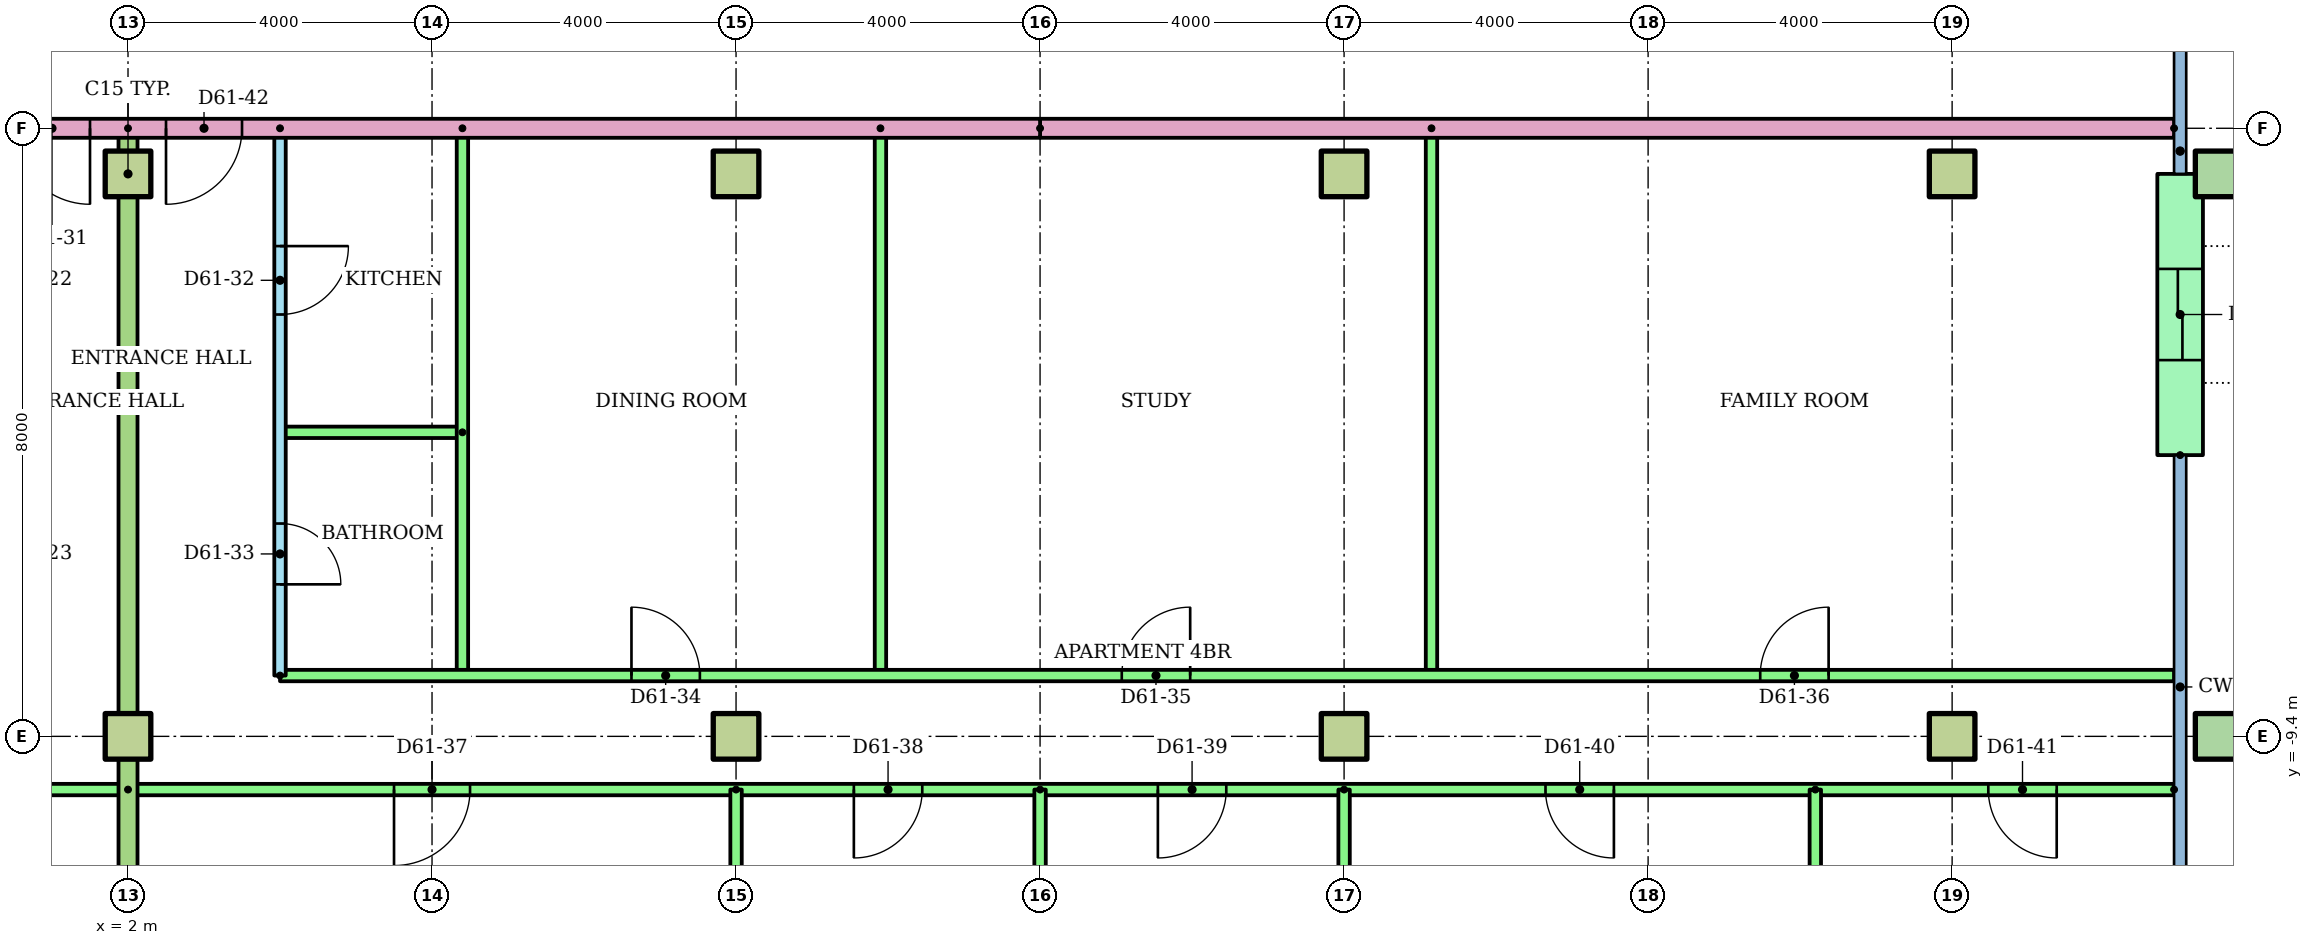
"""IFC4 building model, lengths in metres.
Left out: names, types, materials, properties, quantities, classifications, styles, units other than length and angle.
Written with IfcOpenShell. Run it as: python <this file> out.ifc"""

import sys

from ifc_helpers import new_model, si_unit, direction, frame, frame_2d, origin, origin_2d, place, context, subcontext, project, spatial, rectangle, hollow_rectangle, extrude, element, fill, save


model = new_model("IFC4")
c1 = context("Model", 3, precision=1e-05, world=origin(), true_north=direction((0.0, 1.0)))
c2 = subcontext(c1, "Body", "Model", "MODEL_VIEW")
j1 = project(units=[si_unit("LENGTHUNIT", "METRE"), si_unit("PLANEANGLEUNIT", "RADIAN")], contexts=[c1])
p1 = place(None, origin())
s1 = spatial("IfcSite", under=j1, at=p1, CompositionType="ELEMENT")
p2 = place(p1, origin())
s2 = spatial("IfcBuilding", under=s1, at=p2, CompositionType="ELEMENT")
p3 = place(p2, frame((0.0, 0.0, 233.2)))
s3 = spatial("IfcBuildingStorey", under=s2, at=p3, CompositionType="ELEMENT", Elevation=233.2)
for number, where in (
    (1, (2.0, -9.4, 0.0)),
    (2, (10.0, -9.4, 0.0)),
    (3, (18.0, -9.4, 0.0)),
    (4, (26.0, -9.4, 0.0)),
):
    element("IfcColumn", number, at=place(p3, frame(where)), inside=s3, PredefinedType="COLUMN", context=c2, shape_type="SweptSolid", body=[
        extrude(rectangle(XDim=0.6, YDim=0.6, at=origin_2d()), origin(), (0.0, 0.0, 1.0), 3.2),
    ])
p4 = place(p3, frame((29.5, -9.4, 0.0)))
e5 = element("IfcColumn", 5, at=p4, inside=s3, PredefinedType="COLUMN", context=c2, shape_type="SweptSolid", body=[
    extrude(hollow_rectangle(XDim=0.6, YDim=0.6, WallThickness=0.03, at=origin_2d()), origin(), (0.0, 0.0, 1.0), 3.2),
])
for number, where in (
    (6, (2.0, -2.0, 0.0)),
    (7, (10.0, -2.0, 0.0)),
    (8, (18.0, -2.0, 0.0)),
    (9, (26.0, -2.0, 0.0)),
):
    element("IfcColumn", number, at=place(p3, frame(where)), inside=s3, PredefinedType="COLUMN", context=c2, shape_type="SweptSolid", body=[
        extrude(rectangle(XDim=0.6, YDim=0.6, at=origin_2d()), origin(), (0.0, 0.0, 1.0), 3.2),
    ])
p5 = place(p3, frame((29.5, -2.0, 0.0)))
e10 = element("IfcColumn", 10, at=p5, inside=s3, PredefinedType="COLUMN", context=c2, shape_type="SweptSolid", body=[
    extrude(hollow_rectangle(XDim=0.6, YDim=0.6, WallThickness=0.03, at=origin_2d()), origin(), (0.0, 0.0, 1.0), 3.2),
])
p6 = place(p3, frame((29.0, -5.7, 0.0), z_axis=(0.0, 0.0, 1.0), x_axis=(0.0, 1.0, 0.0)))
e11 = element("IfcWall", 11, at=p6, inside=s3, PredefinedType="STANDARD", context=c2, shape_type="SweptSolid", body=[
    extrude(rectangle(XDim=3.7, YDim=0.6, at=frame_2d((1.85, 0.0))), origin(), (0.0, 0.0, 1.0), 2.92),
])
p7 = place(p6, frame((1.25, 0.0, 0.0)))
e12 = element("IfcOpeningElement", 12, at=p7, cuts=e11, PredefinedType="OPENING", context=c2, shape_type="SweptSolid", body=[
    extrude(rectangle(XDim=1.2, YDim=2.1, at=frame_2d((0.6, 1.05))), frame((0.0, 0.31, 0.0), z_axis=(0.0, -1.0, 0.0), x_axis=(1.0, 0.0, 0.0)), (0.0, 0.0, 1.0), 0.62),
])
p8 = place(p3, frame((2.0, -10.1, 0.0), z_axis=(0.0, 0.0, 1.0), x_axis=(-1.0, 0.0, 0.0)))
e13 = element("IfcWall", 13, at=p8, inside=s3, PredefinedType="PARTITIONING", context=c2, shape_type="SweptSolid", body=[
    extrude(rectangle(XDim=16.0, YDim=0.15, at=frame_2d((8.0, 0.0))), origin(), (0.0, 0.0, 1.0), 2.4),
])
p9 = place(p8, frame((13.55, 0.0, 0.0)))
e14 = element("IfcOpeningElement", 14, at=p9, cuts=e13, PredefinedType="OPENING", context=c2, shape_type="SweptSolid", body=[
    extrude(rectangle(XDim=0.9, YDim=2.1, at=frame_2d((0.45, 1.05))), frame((0.0, 0.085, 0.0), z_axis=(0.0, -1.0, 0.0), x_axis=(1.0, 0.0, 0.0)), (0.0, 0.0, 1.0), 0.17),
])
p10 = place(p8, frame((9.5, 0.0, 0.0)))
e15 = element("IfcOpeningElement", 15, at=p10, cuts=e13, PredefinedType="OPENING", context=c2, shape_type="SweptSolid", body=[
    extrude(rectangle(XDim=1.0, YDim=2.1, at=frame_2d((0.5, 1.05))), frame((0.0, 0.085, 0.0), z_axis=(0.0, -1.0, 0.0), x_axis=(1.0, 0.0, 0.0)), (0.0, 0.0, 1.0), 0.17),
])
p11 = place(p8, frame((5.55, 0.0, 0.0)))
e16 = element("IfcOpeningElement", 16, at=p11, cuts=e13, PredefinedType="OPENING", context=c2, shape_type="SweptSolid", body=[
    extrude(rectangle(XDim=0.9, YDim=2.1, at=frame_2d((0.45, 1.05))), frame((0.0, 0.085, 0.0), z_axis=(0.0, -1.0, 0.0), x_axis=(1.0, 0.0, 0.0)), (0.0, 0.0, 1.0), 0.17),
])
p12 = place(p8, frame((1.55, 0.0, 0.0)))
e17 = element("IfcOpeningElement", 17, at=p12, cuts=e13, PredefinedType="OPENING", context=c2, shape_type="SweptSolid", body=[
    extrude(rectangle(XDim=0.9, YDim=2.1, at=frame_2d((0.45, 1.05))), frame((0.0, 0.085, 0.0), z_axis=(0.0, -1.0, 0.0), x_axis=(1.0, 0.0, 0.0)), (0.0, 0.0, 1.0), 0.17),
])
p13 = place(p3, frame((4.0, -1.4, 0.0), z_axis=(0.0, 0.0, 1.0), x_axis=(0.0, -1.0, 0.0)))
e18 = element("IfcWall", 18, at=p13, inside=s3, PredefinedType="PARTITIONING", context=c2, shape_type="SweptSolid", body=[
    extrude(rectangle(XDim=7.2, YDim=0.15, at=frame_2d((3.6, 0.0))), origin(), (0.0, 0.0, 1.0), 2.4),
])
p14 = place(p13, frame((1.55, 0.0, 0.0)))
e19 = element("IfcOpeningElement", 19, at=p14, cuts=e18, PredefinedType="OPENING", context=c2, shape_type="SweptSolid", body=[
    extrude(rectangle(XDim=0.9, YDim=2.1, at=frame_2d((0.45, 1.05))), frame((0.0, 0.085, 0.0), z_axis=(0.0, -1.0, 0.0), x_axis=(1.0, 0.0, 0.0)), (0.0, 0.0, 1.0), 0.17),
])
p15 = place(p13, frame((5.2, 0.0, 0.0)))
e20 = element("IfcOpeningElement", 20, at=p15, cuts=e18, PredefinedType="OPENING", context=c2, shape_type="SweptSolid", body=[
    extrude(rectangle(XDim=0.8, YDim=2.1, at=frame_2d((0.4, 1.05))), frame((0.0, 0.085, 0.0), z_axis=(0.0, -1.0, 0.0), x_axis=(1.0, 0.0, 0.0)), (0.0, 0.0, 1.0), 0.17),
])
p16 = place(p3, frame((6.4, -5.4, 0.0), z_axis=(0.0, 0.0, 1.0), x_axis=(-1.0, 0.0, 0.0)))
e21 = element("IfcWall", 21, at=p16, inside=s3, PredefinedType="PARTITIONING", context=c2, shape_type="SweptSolid", body=[
    extrude(rectangle(XDim=2.4, YDim=0.15, at=frame_2d((1.2, 0.0))), origin(), (0.0, 0.0, 1.0), 2.4),
])
for number, where, z_axis, x_axis in (
    (22, (6.4, -1.4, 0.0), (0.0, 0.0, 1.0), (0.0, -1.0, 0.0)),
    (23, (11.9, -1.4, 0.0), (0.0, 0.0, 1.0), (0.0, -1.0, 0.0)),
    (24, (19.15, -1.4, 0.0), (0.0, 0.0, 1.0), (0.0, -1.0, 0.0)),
):
    element("IfcWall", number, at=place(p3, frame(where, z_axis=z_axis, x_axis=x_axis)), inside=s3, PredefinedType="PARTITIONING", context=c2, shape_type="SweptSolid", body=[
        extrude(rectangle(XDim=7.2, YDim=0.15, at=frame_2d((3.6, 0.0))), origin(), (0.0, 0.0, 1.0), 2.4),
    ])
p17 = place(p3, frame((4.0, -8.6, 0.0)))
e25 = element("IfcWall", 25, at=p17, inside=s3, PredefinedType="PARTITIONING", context=c2, shape_type="SweptSolid", body=[
    extrude(rectangle(XDim=24.92, YDim=0.15, at=frame_2d((12.46, 0.0))), origin(), (0.0, 0.0, 1.0), 2.4),
])
p18 = place(p17, frame((4.624, 0.0, 0.0)))
e26 = element("IfcOpeningElement", 26, at=p18, cuts=e25, PredefinedType="OPENING", context=c2, shape_type="SweptSolid", body=[
    extrude(rectangle(XDim=0.9, YDim=2.1, at=frame_2d((0.45, 1.05))), frame((0.0, 0.085, 0.0), z_axis=(0.0, -1.0, 0.0), x_axis=(1.0, 0.0, 0.0)), (0.0, 0.0, 1.0), 0.17),
])
p19 = place(p17, frame((11.075, 0.0, 0.0)))
e27 = element("IfcOpeningElement", 27, at=p19, cuts=e25, PredefinedType="OPENING", context=c2, shape_type="SweptSolid", body=[
    extrude(rectangle(XDim=0.9, YDim=2.1, at=frame_2d((0.45, 1.05))), frame((0.0, 0.085, 0.0), z_axis=(0.0, -1.0, 0.0), x_axis=(1.0, 0.0, 0.0)), (0.0, 0.0, 1.0), 0.17),
])
p20 = place(p17, frame((19.475, 0.0, 0.0)))
e28 = element("IfcOpeningElement", 28, at=p20, cuts=e25, PredefinedType="OPENING", context=c2, shape_type="SweptSolid", body=[
    extrude(rectangle(XDim=0.9, YDim=2.1, at=frame_2d((0.45, 1.05))), frame((0.0, 0.085, 0.0), z_axis=(0.0, -1.0, 0.0), x_axis=(1.0, 0.0, 0.0)), (0.0, 0.0, 1.0), 0.17),
])
p21 = place(p3, frame((28.92, -10.1, 0.0), z_axis=(0.0, 0.0, 1.0), x_axis=(-1.0, 0.0, 0.0)))
e29 = element("IfcWall", 29, at=p21, inside=s3, PredefinedType="PARTITIONING", context=c2, shape_type="SweptSolid", body=[
    extrude(rectangle(XDim=26.92, YDim=0.15, at=frame_2d((13.46, 0.0))), origin(), (0.0, 0.0, 1.0), 2.4),
])
p22 = place(p21, frame((22.42, 0.0, 0.0)))
e30 = element("IfcOpeningElement", 30, at=p22, cuts=e29, PredefinedType="OPENING", context=c2, shape_type="SweptSolid", body=[
    extrude(rectangle(XDim=1.0, YDim=2.1, at=frame_2d((0.5, 1.05))), frame((0.0, 0.085, 0.0), z_axis=(0.0, -1.0, 0.0), x_axis=(1.0, 0.0, 0.0)), (0.0, 0.0, 1.0), 0.17),
])
p23 = place(p21, frame((16.47, 0.0, 0.0)))
e31 = element("IfcOpeningElement", 31, at=p23, cuts=e29, PredefinedType="OPENING", context=c2, shape_type="SweptSolid", body=[
    extrude(rectangle(XDim=0.9, YDim=2.1, at=frame_2d((0.45, 1.05))), frame((0.0, 0.085, 0.0), z_axis=(0.0, -1.0, 0.0), x_axis=(1.0, 0.0, 0.0)), (0.0, 0.0, 1.0), 0.17),
])
p24 = place(p21, frame((12.47, 0.0, 0.0)))
e32 = element("IfcOpeningElement", 32, at=p24, cuts=e29, PredefinedType="OPENING", context=c2, shape_type="SweptSolid", body=[
    extrude(rectangle(XDim=0.9, YDim=2.1, at=frame_2d((0.45, 1.05))), frame((0.0, 0.085, 0.0), z_axis=(0.0, -1.0, 0.0), x_axis=(1.0, 0.0, 0.0)), (0.0, 0.0, 1.0), 0.17),
])
p25 = place(p21, frame((7.37, 0.0, 0.0)))
e33 = element("IfcOpeningElement", 33, at=p25, cuts=e29, PredefinedType="OPENING", context=c2, shape_type="SweptSolid", body=[
    extrude(rectangle(XDim=0.9, YDim=2.1, at=frame_2d((0.45, 1.05))), frame((0.0, 0.085, 0.0), z_axis=(0.0, -1.0, 0.0), x_axis=(1.0, 0.0, 0.0)), (0.0, 0.0, 1.0), 0.17),
])
p26 = place(p21, frame((1.544, 0.0, 0.0)))
e34 = element("IfcOpeningElement", 34, at=p26, cuts=e29, PredefinedType="OPENING", context=c2, shape_type="SweptSolid", body=[
    extrude(rectangle(XDim=0.9, YDim=2.1, at=frame_2d((0.45, 1.05))), frame((0.0, 0.085, 0.0), z_axis=(0.0, -1.0, 0.0), x_axis=(1.0, 0.0, 0.0)), (0.0, 0.0, 1.0), 0.17),
])
p27 = place(p3, frame((10.0, -10.1, 0.0), z_axis=(0.0, 0.0, 1.0), x_axis=(0.0, -1.0, 0.0)))
e35 = element("IfcWall", 35, at=p27, inside=s3, PredefinedType="PARTITIONING", context=c2, shape_type="SweptSolid", body=[
    extrude(rectangle(XDim=6.41, YDim=0.15, at=frame_2d((3.205, 0.0))), origin(), (0.0, 0.0, 1.0), 2.4),
])
p28 = place(p3, frame((14.0, -10.1, 0.0), z_axis=(0.0, 0.0, 1.0), x_axis=(0.0, -1.0, 0.0)))
e36 = element("IfcWall", 36, at=p28, inside=s3, PredefinedType="PARTITIONING", context=c2, shape_type="SweptSolid", body=[
    extrude(rectangle(XDim=6.421, YDim=0.15, at=frame_2d((3.21, 0.0))), origin(), (0.0, 0.0, 1.0), 2.4),
])
p29 = place(p3, frame((18.0, -10.1, 0.0), z_axis=(0.0, 0.0, 1.0), x_axis=(0.0, -1.0, 0.0)))
e37 = element("IfcWall", 37, at=p29, inside=s3, PredefinedType="PARTITIONING", context=c2, shape_type="SweptSolid", body=[
    extrude(rectangle(XDim=6.41, YDim=0.15, at=frame_2d((3.205, 0.0))), origin(), (0.0, 0.0, 1.0), 2.4),
])
p30 = place(p3, frame((24.2, -10.1, 0.0), z_axis=(0.0, 0.0, 1.0), x_axis=(0.0, -1.0, 0.0)))
e38 = element("IfcWall", 38, at=p30, inside=s3, PredefinedType="PARTITIONING", context=c2, shape_type="SweptSolid", body=[
    extrude(rectangle(XDim=4.62, YDim=0.15, at=frame_2d((2.31, 0.0))), origin(), (0.0, 0.0, 1.0), 2.4),
])
p31 = place(p3, frame((2.0, -1.4, 0.0), z_axis=(0.0, 0.0, 1.0), x_axis=(0.0, -1.0, 0.0)))
e39 = element("IfcWall", 39, at=p31, inside=s3, PredefinedType="PARTITIONING", context=c2, shape_type="SweptSolid", body=[
    extrude(rectangle(XDim=15.11, YDim=0.25, at=frame_2d((7.555, 0.0))), origin(), (0.0, 0.0, 1.0), 2.4),
])
p32 = place(p3, frame((28.92, -1.4, 0.0), z_axis=(0.0, 0.0, 1.0), x_axis=(-1.0, 0.0, 0.0)))
e40 = element("IfcWall", 40, at=p32, inside=s3, PredefinedType="PARTITIONING", context=c2, shape_type="SweptSolid", body=[
    extrude(rectangle(XDim=14.92, YDim=0.25, at=frame_2d((7.46, 0.0))), origin(), (0.0, 0.0, 1.0), 2.4),
])
p33 = place(p3, frame((14.0, -1.4, 0.0), z_axis=(0.0, 0.0, 1.0), x_axis=(-1.0, 0.0, 0.0)))
e41 = element("IfcWall", 41, at=p33, inside=s3, PredefinedType="PARTITIONING", context=c2, shape_type="SweptSolid", body=[
    extrude(rectangle(XDim=28.0, YDim=0.25, at=frame_2d((14.0, 0.0))), origin(), (0.0, 0.0, 1.0), 2.4),
])
p34 = place(p33, frame((12.5, 0.0, 0.0)))
e42 = element("IfcOpeningElement", 42, at=p34, cuts=e41, PredefinedType="OPENING", context=c2, shape_type="SweptSolid", body=[
    extrude(rectangle(XDim=1.0, YDim=2.1, at=frame_2d((0.5, 1.05))), frame((0.0, 0.135, 0.0), z_axis=(0.0, -1.0, 0.0), x_axis=(1.0, 0.0, 0.0)), (0.0, 0.0, 1.0), 0.27),
])
p35 = place(p33, frame((10.5, 0.0, 0.0)))
e43 = element("IfcOpeningElement", 43, at=p35, cuts=e41, PredefinedType="OPENING", context=c2, shape_type="SweptSolid", body=[
    extrude(rectangle(XDim=1.0, YDim=2.1, at=frame_2d((0.5, 1.05))), frame((0.0, 0.135, 0.0), z_axis=(0.0, -1.0, 0.0), x_axis=(1.0, 0.0, 0.0)), (0.0, 0.0, 1.0), 0.27),
])
p36 = place(p34, origin())
e44 = element("IfcDoor", 44, at=p36, inside=s3, OperationType="SINGLE_SWING_LEFT", PredefinedType="DOOR", context=c2, shape_type="SweptSolid", body=[
    extrude(rectangle(XDim=1.0, YDim=2.1, at=frame_2d((0.5, 1.05))), frame((0.0, 0.025, 0.0), z_axis=(0.0, -1.0, 0.0), x_axis=(1.0, 0.0, 0.0)), (0.0, 0.0, 1.0), 0.05),
])
fill(e42, e44)
p37 = place(p14, origin())
e45 = element("IfcDoor", 45, at=p37, inside=s3, OperationType="SINGLE_SWING_LEFT", PredefinedType="DOOR", context=c2, shape_type="SweptSolid", body=[
    extrude(rectangle(XDim=0.9, YDim=2.1, at=frame_2d((0.45, 1.05))), frame((0.0, 0.025, 0.0), z_axis=(0.0, -1.0, 0.0), x_axis=(1.0, 0.0, 0.0)), (0.0, 0.0, 1.0), 0.05),
])
fill(e19, e45)
p38 = place(p15, origin())
e46 = element("IfcDoor", 46, at=p38, inside=s3, OperationType="SINGLE_SWING_RIGHT", PredefinedType="DOOR", context=c2, shape_type="SweptSolid", body=[
    extrude(rectangle(XDim=0.8, YDim=2.1, at=frame_2d((0.4, 1.05))), frame((0.0, 0.025, 0.0), z_axis=(0.0, -1.0, 0.0), x_axis=(1.0, 0.0, 0.0)), (0.0, 0.0, 1.0), 0.05),
])
fill(e20, e46)
p39 = place(p18, origin())
e47 = element("IfcDoor", 47, at=p39, inside=s3, OperationType="SINGLE_SWING_LEFT", PredefinedType="DOOR", context=c2, shape_type="SweptSolid", body=[
    extrude(rectangle(XDim=0.9, YDim=2.1, at=frame_2d((0.45, 1.05))), frame((0.0, 0.025, 0.0), z_axis=(0.0, -1.0, 0.0), x_axis=(1.0, 0.0, 0.0)), (0.0, 0.0, 1.0), 0.05),
])
fill(e26, e47)
p40 = place(p19, origin())
e48 = element("IfcDoor", 48, at=p40, inside=s3, OperationType="SINGLE_SWING_RIGHT", PredefinedType="DOOR", context=c2, shape_type="SweptSolid", body=[
    extrude(rectangle(XDim=0.9, YDim=2.1, at=frame_2d((0.45, 1.05))), frame((0.0, 0.025, 0.0), z_axis=(0.0, -1.0, 0.0), x_axis=(1.0, 0.0, 0.0)), (0.0, 0.0, 1.0), 0.05),
])
fill(e27, e48)
p41 = place(p20, origin())
e49 = element("IfcDoor", 49, at=p41, inside=s3, OperationType="SINGLE_SWING_RIGHT", PredefinedType="DOOR", context=c2, shape_type="SweptSolid", body=[
    extrude(rectangle(XDim=0.9, YDim=2.1, at=frame_2d((0.45, 1.05))), frame((0.0, 0.025, 0.0), z_axis=(0.0, -1.0, 0.0), x_axis=(1.0, 0.0, 0.0)), (0.0, 0.0, 1.0), 0.05),
])
fill(e28, e49)
p42 = place(p22, origin())
e50 = element("IfcDoor", 50, at=p42, inside=s3, OperationType="SINGLE_SWING_RIGHT", PredefinedType="DOOR", context=c2, shape_type="SweptSolid", body=[
    extrude(rectangle(XDim=1.0, YDim=2.1, at=frame_2d((0.5, 1.05))), frame((0.0, 0.025, 0.0), z_axis=(0.0, -1.0, 0.0), x_axis=(1.0, 0.0, 0.0)), (0.0, 0.0, 1.0), 0.05),
])
fill(e30, e50)
p43 = place(p23, origin())
e51 = element("IfcDoor", 51, at=p43, inside=s3, OperationType="SINGLE_SWING_RIGHT", PredefinedType="DOOR", context=c2, shape_type="SweptSolid", body=[
    extrude(rectangle(XDim=0.9, YDim=2.1, at=frame_2d((0.45, 1.05))), frame((0.0, 0.025, 0.0), z_axis=(0.0, -1.0, 0.0), x_axis=(1.0, 0.0, 0.0)), (0.0, 0.0, 1.0), 0.05),
])
fill(e31, e51)
p44 = place(p24, origin())
e52 = element("IfcDoor", 52, at=p44, inside=s3, OperationType="SINGLE_SWING_RIGHT", PredefinedType="DOOR", context=c2, shape_type="SweptSolid", body=[
    extrude(rectangle(XDim=0.9, YDim=2.1, at=frame_2d((0.45, 1.05))), frame((0.0, 0.025, 0.0), z_axis=(0.0, -1.0, 0.0), x_axis=(1.0, 0.0, 0.0)), (0.0, 0.0, 1.0), 0.05),
])
fill(e32, e52)
p45 = place(p25, origin())
e53 = element("IfcDoor", 53, at=p45, inside=s3, OperationType="SINGLE_SWING_LEFT", PredefinedType="DOOR", context=c2, shape_type="SweptSolid", body=[
    extrude(rectangle(XDim=0.9, YDim=2.1, at=frame_2d((0.45, 1.05))), frame((0.0, 0.025, 0.0), z_axis=(0.0, -1.0, 0.0), x_axis=(1.0, 0.0, 0.0)), (0.0, 0.0, 1.0), 0.05),
])
fill(e33, e53)
p46 = place(p26, origin())
e54 = element("IfcDoor", 54, at=p46, inside=s3, OperationType="SINGLE_SWING_LEFT", PredefinedType="DOOR", context=c2, shape_type="SweptSolid", body=[
    extrude(rectangle(XDim=0.9, YDim=2.1, at=frame_2d((0.45, 1.05))), frame((0.0, 0.025, 0.0), z_axis=(0.0, -1.0, 0.0), x_axis=(1.0, 0.0, 0.0)), (0.0, 0.0, 1.0), 0.05),
])
fill(e34, e54)
p47 = place(p35, origin())
e55 = element("IfcDoor", 55, at=p47, inside=s3, OperationType="SINGLE_SWING_RIGHT", PredefinedType="DOOR", context=c2, shape_type="SweptSolid", body=[
    extrude(rectangle(XDim=1.0, YDim=2.1, at=frame_2d((0.5, 1.05))), frame((0.0, 0.025, 0.0), z_axis=(0.0, -1.0, 0.0), x_axis=(1.0, 0.0, 0.0)), (0.0, 0.0, 1.0), 0.05),
])
fill(e43, e55)
p48 = place(p7, origin())
e56 = element("IfcDoor", 56, at=p48, inside=s3, OperationType="SLIDING_TO_LEFT", PredefinedType="DOOR", context=c2, shape_type="SweptSolid", body=[
    extrude(rectangle(XDim=1.2, YDim=2.1, at=frame_2d((0.6, 1.05))), frame((0.0, 0.025, 0.0), z_axis=(0.0, -1.0, 0.0), x_axis=(1.0, 0.0, 0.0)), (0.0, 0.0, 1.0), 0.05),
])
fill(e12, e56)
save(model, sys.argv[1])
